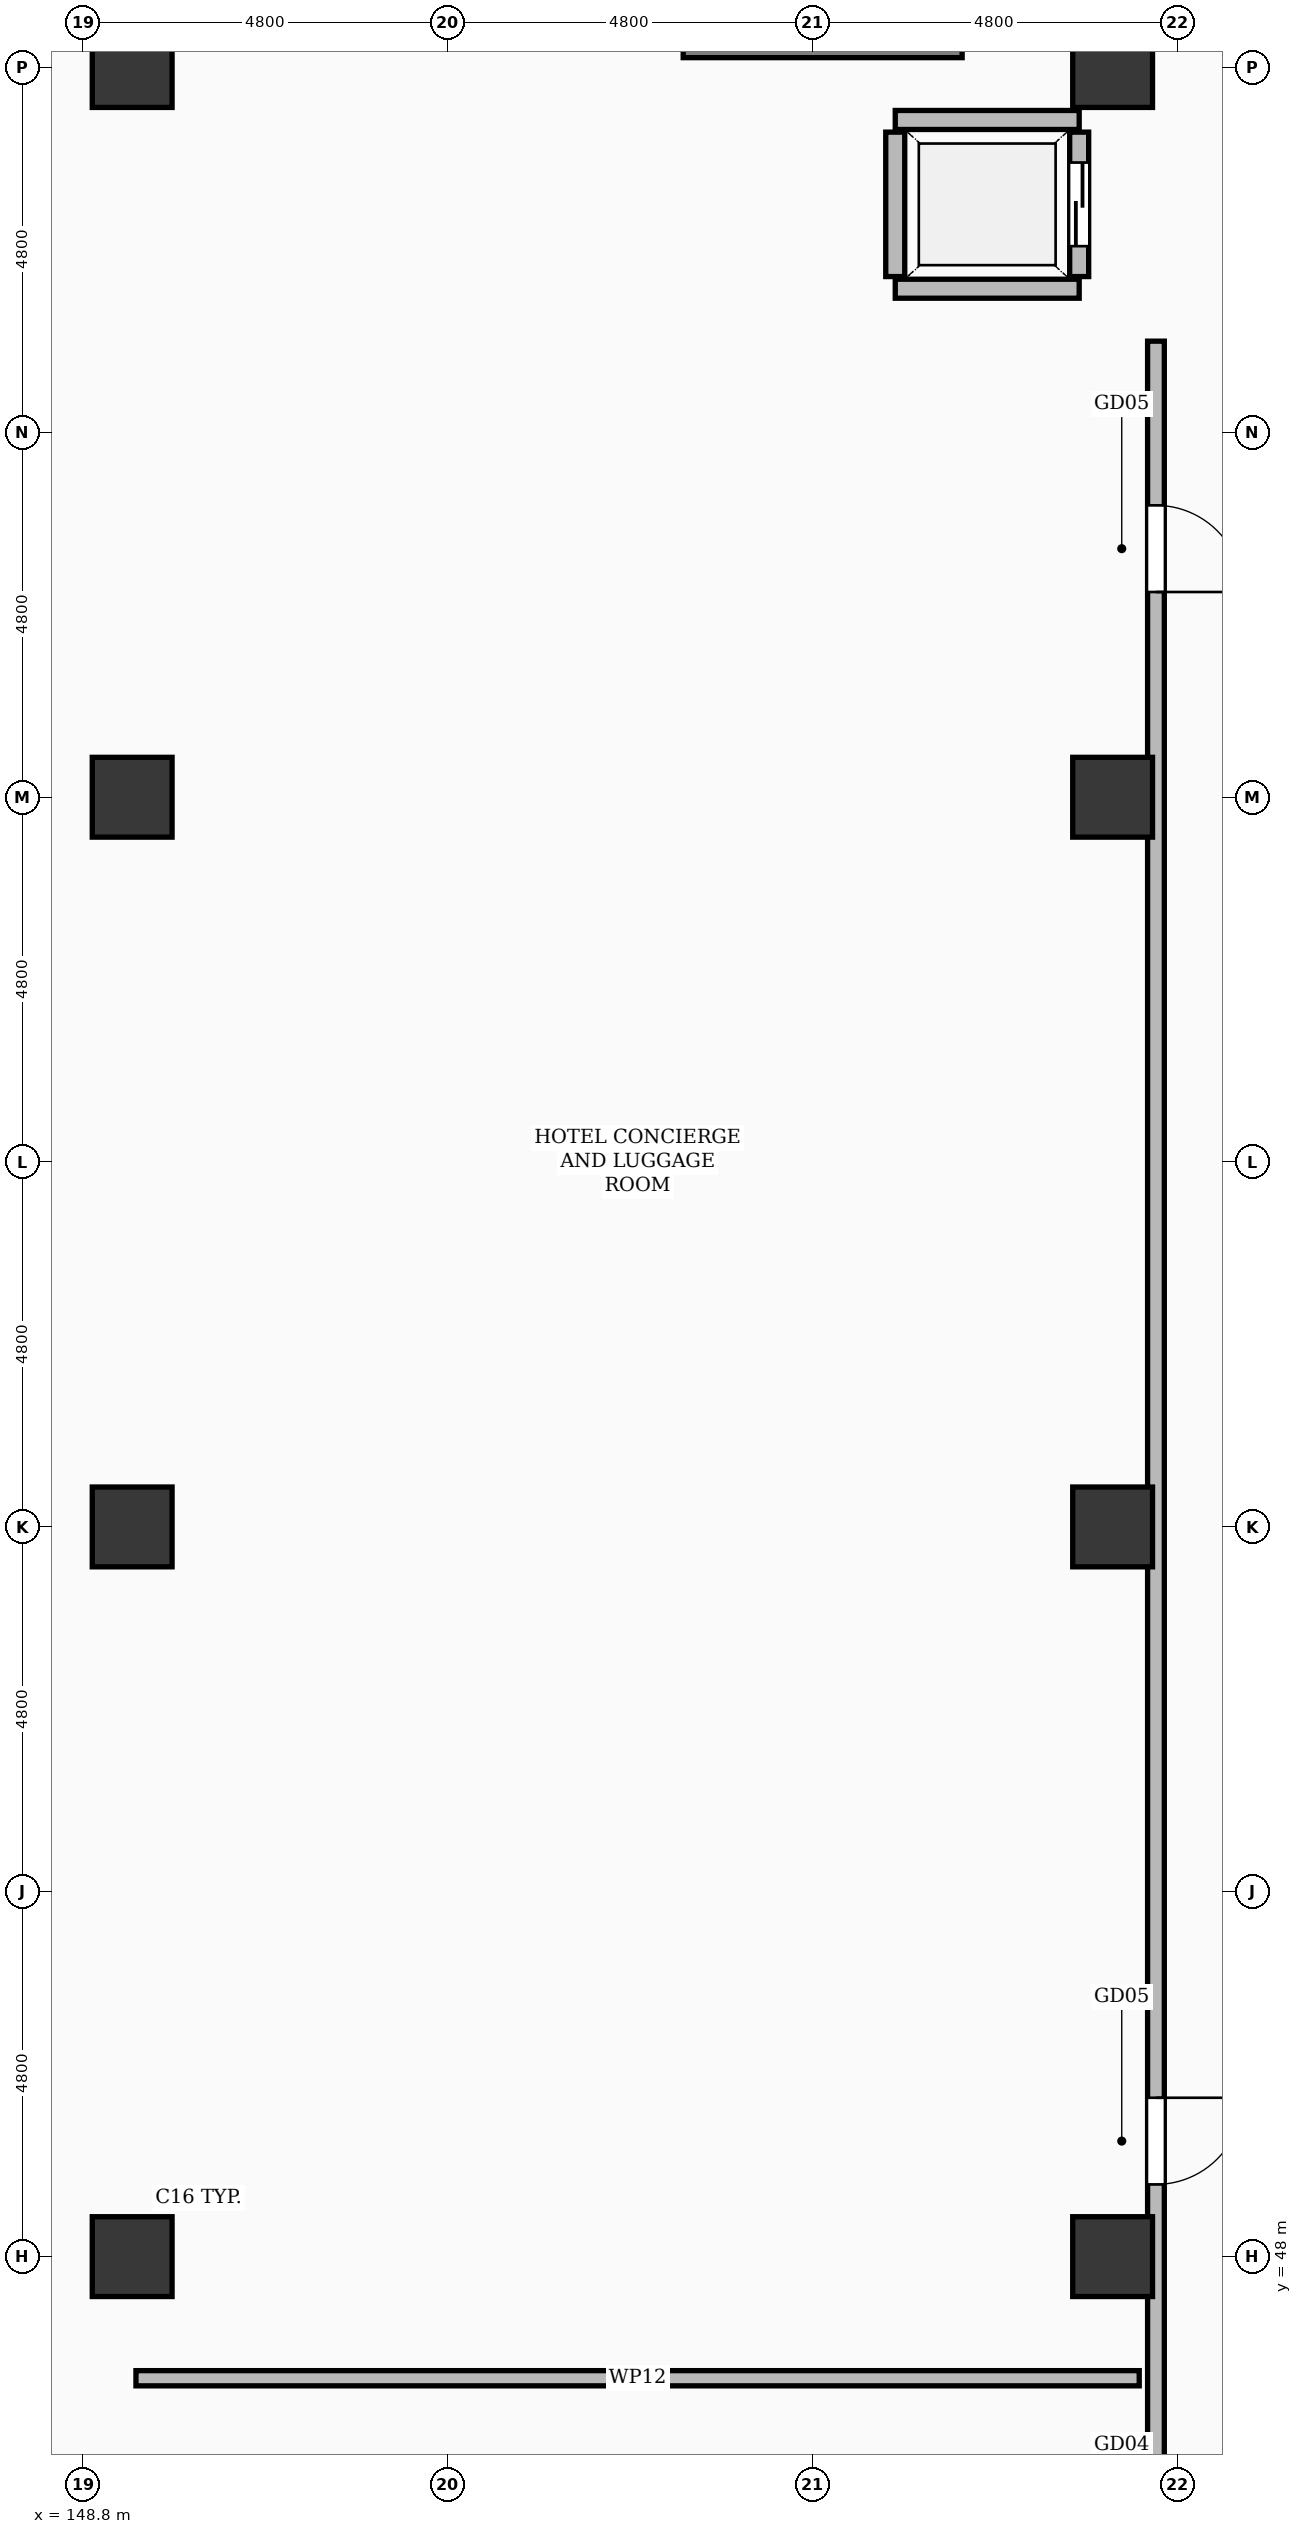
"""IFC4 building model, lengths in metres.
Left out: names, types, materials, properties, quantities, classifications, styles, units other than length and angle.
Written with IfcOpenShell. Run it as: python <this file> out.ifc"""

import sys

from ifc_helpers import new_model, si_unit, direction, frame, frame_2d, origin, origin_2d, place, context, subcontext, project, spatial, rectangle, extrude, element, fill, save


model = new_model("IFC4")
c1 = context("Model", 3, precision=1e-05, world=origin(), true_north=direction((0.0, 1.0)))
c2 = subcontext(c1, "Body", "Model", "MODEL_VIEW")
j1 = project(units=[si_unit("LENGTHUNIT", "METRE"), si_unit("PLANEANGLEUNIT", "RADIAN")], contexts=[c1])
p1 = place(None, origin())
s1 = spatial("IfcSite", under=j1, at=p1, CompositionType="ELEMENT")
p2 = place(p1, origin())
s2 = spatial("IfcBuilding", under=s1, at=p2, CompositionType="ELEMENT")
p3 = place(p2, origin())
s3 = spatial("IfcBuildingStorey", under=s2, at=p3, CompositionType="ELEMENT", Elevation=0.0)
for number, where, z_axis, x_axis in (
    (1, (149.45, 48.0, 0.0), (0.0, 0.0, 1.0), (1.0, 0.0, 0.0)),
    (2, (149.45, 57.6, 0.0), (0.0, 0.0, 1.0), (1.0, 0.0, 0.0)),
    (3, (149.45, 67.2, 0.0), (0.0, 0.0, 1.0), (1.0, 0.0, 0.0)),
    (4, (149.45, 76.8, 0.0), (0.0, 0.0, 1.0), (1.0, 0.0, 0.0)),
    (5, (162.35, 48.0, 0.0), (0.0, 0.0, 1.0), (1.0, 0.0, 0.0)),
    (6, (162.35, 57.6, 0.0), (0.0, 0.0, 1.0), (1.0, 0.0, 0.0)),
    (7, (162.35, 67.2, 0.0), (0.0, 0.0, 1.0), (1.0, 0.0, 0.0)),
    (8, (162.35, 76.8, 0.0), (0.0, 0.0, 1.0), (1.0, 0.0, 0.0)),
):
    element("IfcColumn", number, at=place(p3, frame(where, z_axis=z_axis, x_axis=x_axis)), inside=s3, PredefinedType="COLUMN", context=c2, shape_type="SweptSolid", body=[
        extrude(rectangle(XDim=1.05, YDim=1.05, at=origin_2d()), origin(), (0.0, 0.0, 1.0), 6.0),
    ])
p4 = place(p3, frame((156.7, 77.18, 0.0), z_axis=(0.0, 0.0, 1.0), x_axis=(1.0, 0.0, 0.0)))
e9 = element("IfcWall", 9, at=p4, inside=s3, PredefinedType="SHEAR", context=c2, shape_type="SweptSolid", body=[
    extrude(rectangle(XDim=3.67, YDim=0.5, at=frame_2d((1.835, 0.0))), origin(), (0.0, 0.0, 1.0), 5.7),
])
for number, where, z_axis, x_axis in (
    (10, (159.49, 73.89, 0.0), (0.0, 0.0, 1.0), (1.0, 0.0, 0.0)),
    (11, (159.49, 76.11, 0.0), (0.0, 0.0, 1.0), (1.0, 0.0, 0.0)),
):
    element("IfcWall", number, at=place(p3, frame(where, z_axis=z_axis, x_axis=x_axis)), inside=s3, PredefinedType="SOLIDWALL", context=c2, shape_type="SweptSolid", body=[
        extrude(rectangle(XDim=2.42, YDim=0.25, at=frame_2d((1.21, 0.0))), origin(), (0.0, 0.0, 1.0), 5.7),
    ])
p5 = place(p3, frame((159.49, 74.05, 0.0), z_axis=(0.0, 0.0, 1.0), x_axis=(0.0, 1.0, 0.0)))
e12 = element("IfcWall", 12, at=p5, inside=s3, PredefinedType="SOLIDWALL", context=c2, shape_type="SweptSolid", body=[
    extrude(rectangle(XDim=1.9, YDim=0.25, at=frame_2d((0.95, 0.0))), origin(), (0.0, 0.0, 1.0), 5.7),
])
p6 = place(p3, frame((161.91, 74.05, 0.0), z_axis=(0.0, 0.0, 1.0), x_axis=(0.0, 1.0, 0.0)))
e13 = element("IfcWall", 13, at=p6, inside=s3, PredefinedType="SOLIDWALL", context=c2, shape_type="SweptSolid", body=[
    extrude(rectangle(XDim=1.9, YDim=0.25, at=frame_2d((0.95, 0.0))), origin(), (0.0, 0.0, 1.0), 5.7),
])
p7 = place(p6, frame((0.4, 0.0, 0.0)))
e14 = element("IfcOpeningElement", 14, at=p7, cuts=e13, PredefinedType="OPENING", context=c2, shape_type="SweptSolid", body=[
    extrude(rectangle(XDim=1.1, YDim=2.2, at=frame_2d((0.55, 1.1))), frame((0.0, 0.137, 0.0), z_axis=(0.0, -1.0, 0.0), x_axis=(1.0, 0.0, 0.0)), (0.0, 0.0, 1.0), 0.274),
])
p8 = place(p3, frame((162.92, 0.35, 0.0), z_axis=(0.0, 0.0, 1.0), x_axis=(0.0, 1.0, 0.0)))
e15 = element("IfcWall", 15, at=p8, inside=s3, PredefinedType="PARTITIONING", context=c2, shape_type="SweptSolid", body=[
    extrude(rectangle(XDim=72.85, YDim=0.22, at=frame_2d((36.425, 0.0))), origin(), (0.0, 0.0, 1.0), 4.692),
])
p9 = place(p8, frame((1.95, 0.0, 0.0)))
e16 = element("IfcOpeningElement", 16, at=p9, cuts=e15, PredefinedType="OPENING", context=c2, shape_type="SweptSolid", body=[
    extrude(rectangle(XDim=1.05, YDim=2.22, at=frame_2d((0.525, 1.11))), frame((0.0, 0.122, 0.0), z_axis=(0.0, -1.0, 0.0), x_axis=(1.0, 0.0, 0.0)), (0.0, 0.0, 1.0), 0.244),
])
p10 = place(p8, frame((42.75, 0.0, 0.0)))
e17 = element("IfcOpeningElement", 17, at=p10, cuts=e15, PredefinedType="OPENING", context=c2, shape_type="SweptSolid", body=[
    extrude(rectangle(XDim=1.05, YDim=2.22, at=frame_2d((0.525, 1.11))), frame((0.0, 0.122, 0.0), z_axis=(0.0, -1.0, 0.0), x_axis=(1.0, 0.0, 0.0)), (0.0, 0.0, 1.0), 0.244),
])
p11 = place(p8, frame((48.6, 0.0, 0.0)))
e18 = element("IfcOpeningElement", 18, at=p11, cuts=e15, PredefinedType="OPENING", context=c2, shape_type="SweptSolid", body=[
    extrude(rectangle(XDim=1.14, YDim=2.26, at=frame_2d((0.57, 1.13))), frame((0.0, 0.122, 0.0), z_axis=(0.0, -1.0, 0.0), x_axis=(1.0, 0.0, 0.0)), (0.0, 0.0, 1.0), 0.244),
])
p12 = place(p8, frame((69.55, 0.0, 0.0)))
e19 = element("IfcOpeningElement", 19, at=p12, cuts=e15, PredefinedType="OPENING", context=c2, shape_type="SweptSolid", body=[
    extrude(rectangle(XDim=1.14, YDim=2.26, at=frame_2d((0.57, 1.13))), frame((0.0, 0.122, 0.0), z_axis=(0.0, -1.0, 0.0), x_axis=(1.0, 0.0, 0.0)), (0.0, 0.0, 1.0), 0.244),
])
p13 = place(p3, frame((149.5, 46.4, 0.0), z_axis=(0.0, 0.0, 1.0), x_axis=(1.0, 0.0, 0.0)))
e20 = element("IfcWall", 20, at=p13, inside=s3, PredefinedType="PARTITIONING", context=c2, shape_type="SweptSolid", body=[
    extrude(rectangle(XDim=13.2, YDim=0.2, at=frame_2d((6.6, 0.0))), origin(), (0.0, 0.0, 1.0), 4.692),
])
p14 = place(p7, origin())
e21 = element("IfcDoor", 21, at=p14, inside=s3, OperationType="SLIDING_TO_LEFT", PredefinedType="DOOR", context=c2, shape_type="SweptSolid", body=[
    extrude(rectangle(XDim=1.1, YDim=2.2, at=frame_2d((0.55, 1.1))), frame((0.0, 0.025, 0.0), z_axis=(0.0, -1.0, 0.0), x_axis=(1.0, 0.0, 0.0)), (0.0, 0.0, 1.0), 0.05),
])
fill(e14, e21)
p15 = place(p11, frame((1.14, 0.0, 0.0), z_axis=(0.0, 0.0, 1.0), x_axis=(-1.0, 0.0, 0.0)))
e22 = element("IfcDoor", 22, at=p15, inside=s3, OperationType="SINGLE_SWING_RIGHT", PredefinedType="DOOR", context=c2, shape_type="SweptSolid", body=[
    extrude(rectangle(XDim=1.14, YDim=2.26, at=frame_2d((0.57, 1.13))), frame((0.0, 0.025, 0.0), z_axis=(0.0, -1.0, 0.0), x_axis=(1.0, 0.0, 0.0)), (0.0, 0.0, 1.0), 0.05),
])
fill(e18, e22)
p16 = place(p12, frame((1.14, 0.0, 0.0), z_axis=(0.0, 0.0, 1.0), x_axis=(-1.0, 0.0, 0.0)))
e23 = element("IfcDoor", 23, at=p16, inside=s3, OperationType="SINGLE_SWING_LEFT", PredefinedType="DOOR", context=c2, shape_type="SweptSolid", body=[
    extrude(rectangle(XDim=1.14, YDim=2.26, at=frame_2d((0.57, 1.13))), frame((0.0, 0.025, 0.0), z_axis=(0.0, -1.0, 0.0), x_axis=(1.0, 0.0, 0.0)), (0.0, 0.0, 1.0), 0.05),
])
fill(e19, e23)
save(model, sys.argv[1])
